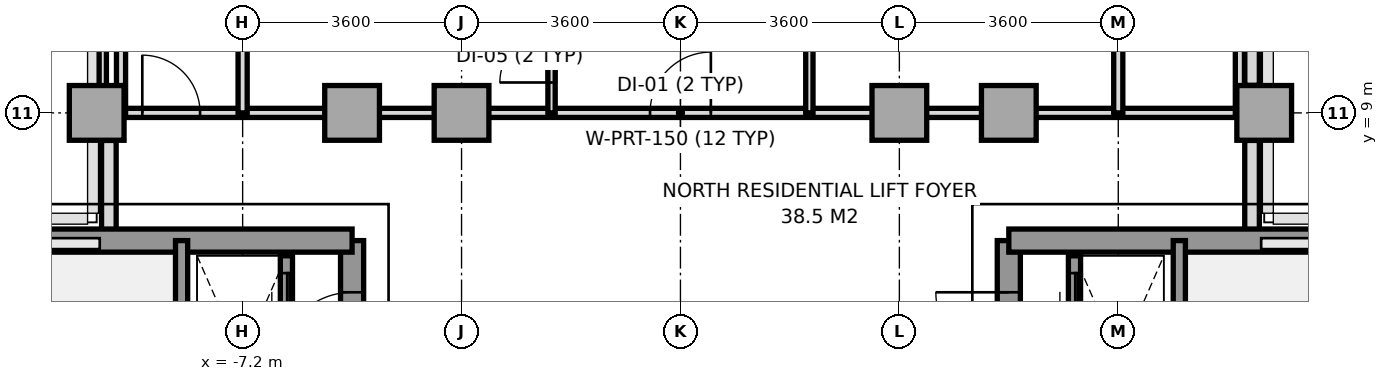
"""IFC4 building model, lengths in metres.
Left out: names, types, materials, properties, quantities, classifications, styles, units other than length and angle.
Written with IfcOpenShell. Run it as: python <this file> out.ifc"""

import sys

from ifc_helpers import new_model, si_unit, direction, frame, frame_2d, origin, origin_2d, place, context, subcontext, project, spatial, rectangle, extrude, source, transform, mapped, element, fill, save


model = new_model("IFC4")
c1 = context("Model", 3, precision=1e-05, world=origin(), true_north=direction((0.0, 1.0)))
c2 = subcontext(c1, "Body", "Model", "MODEL_VIEW")
j1 = project(units=[si_unit("LENGTHUNIT", "METRE"), si_unit("PLANEANGLEUNIT", "RADIAN")], contexts=[c1])
p1 = place(None, origin())
s1 = spatial("IfcSite", under=j1, at=p1, CompositionType="ELEMENT")
p2 = place(p1, origin())
s2 = spatial("IfcBuilding", under=s1, at=p2, CompositionType="ELEMENT")
p3 = place(p2, frame((0.0, 0.0, 204.6)))
s3 = spatial("IfcBuildingStorey", under=s2, at=p3, CompositionType="ELEMENT", Elevation=204.6)
m1 = source(origin(), c2, "Body", "SweptSolid", [
    extrude(rectangle(XDim=0.9, YDim=0.9, at=origin_2d()), origin(), (0.0, 0.0, 1.0), 3.2),
])
for number, where, z_axis, x_axis in (
    (1, (-9.6, 9.0, 0.0), (0.0, 0.0, 1.0), (1.0, 0.0, 0.0)),
    (2, (-5.4, 9.0, 0.0), (0.0, 0.0, 1.0), (1.0, 0.0, 0.0)),
    (3, (-3.6, 9.0, 0.0), (0.0, 0.0, 1.0), (1.0, 0.0, 0.0)),
    (4, (3.6, 9.0, 0.0), (0.0, 0.0, 1.0), (1.0, 0.0, 0.0)),
    (5, (5.4, 9.0, 0.0), (0.0, 0.0, 1.0), (1.0, 0.0, 0.0)),
    (6, (9.6, 9.0, 0.0), (0.0, 0.0, 1.0), (1.0, 0.0, 0.0)),
):
    element("IfcColumn", number, at=place(p3, frame(where, z_axis=z_axis, x_axis=x_axis)), inside=s3, PredefinedType="COLUMN", context=c2, shape_type="MappedRepresentation", body=[
        mapped(m1, transform((0.0, 0.0, 0.0), x_axis=(1.0, 0.0, 0.0), y_axis=(0.0, 1.0, 0.0), z_axis=(0.0, 0.0, 1.0), scale=1.0)),
    ])
p4 = place(p3, frame((-9.4, 6.953, 0.0), z_axis=(0.0, 0.0, 1.0), x_axis=(0.0, 1.0, 0.0)))
e7 = element("IfcWall", 7, at=p4, inside=s3, PredefinedType="PARAPET", context=c2, shape_type="SweptSolid", body=[
    extrude(rectangle(XDim=1.594, YDim=0.24, at=frame_2d((0.797, 0.0))), origin(), (0.0, 0.0, 1.0), 1.15),
])
p5 = place(p3, frame((9.4, 15.358, 0.0), z_axis=(0.0, 0.0, 1.0), x_axis=(0.0, -1.0, 0.0)))
e8 = element("IfcWall", 8, at=p5, inside=s3, PredefinedType="PARAPET", context=c2, shape_type="SweptSolid", body=[
    extrude(rectangle(XDim=5.905, YDim=0.24, at=frame_2d((2.952, 0.0))), origin(), (0.0, 0.0, 1.0), 1.15),
])
p6 = place(p3, frame((9.4, 8.547, 0.0), z_axis=(0.0, 0.0, 1.0), x_axis=(0.0, -1.0, 0.0)))
e9 = element("IfcWall", 9, at=p6, inside=s3, PredefinedType="PARAPET", context=c2, shape_type="SweptSolid", body=[
    extrude(rectangle(XDim=1.594, YDim=0.24, at=frame_2d((0.797, 0.0))), origin(), (0.0, 0.0, 1.0), 1.15),
])
p7 = place(p3, frame((-5.4, -5.6, 0.0), z_axis=(0.0, 0.0, 1.0), x_axis=(0.0, 1.0, 0.0)))
e10 = element("IfcWall", 10, at=p7, inside=s3, PredefinedType="SHEAR", context=c2, shape_type="SweptSolid", body=[
    extrude(rectangle(XDim=12.5, YDim=0.38, at=frame_2d((6.25, 0.0))), origin(), (0.0, 0.0, 1.0), 3.2),
])
p8 = place(p7, frame((4.55, 0.0, 0.0)))
e11 = element("IfcOpeningElement", 11, at=p8, cuts=e10, PredefinedType="OPENING", context=c2, shape_type="SweptSolid", body=[
    extrude(rectangle(XDim=1.2, YDim=2.2, at=frame_2d((0.6, 1.1))), frame((0.0, 0.2, 0.0), z_axis=(0.0, -1.0, 0.0), x_axis=(1.0, 0.0, 0.0)), (0.0, 0.0, 1.0), 0.4),
])
p9 = place(p7, frame((10.45, 0.0, 0.0)))
e12 = element("IfcOpeningElement", 12, at=p9, cuts=e10, PredefinedType="OPENING", context=c2, shape_type="SweptSolid", body=[
    extrude(rectangle(XDim=1.2, YDim=2.2, at=frame_2d((0.6, 1.1))), frame((0.0, 0.2, 0.0), z_axis=(0.0, -1.0, 0.0), x_axis=(1.0, 0.0, 0.0)), (0.0, 0.0, 1.0), 0.4),
])
p10 = place(p7, frame((6.86, 0.0, 0.0)))
e13 = element("IfcOpeningElement", 13, at=p10, cuts=e10, PredefinedType="OPENING", context=c2, shape_type="SweptSolid", body=[
    extrude(rectangle(XDim=0.8, YDim=2.1, at=frame_2d((0.4, 1.05))), frame((0.0, 0.2, 0.0), z_axis=(0.0, -1.0, 0.0), x_axis=(1.0, 0.0, 0.0)), (0.0, 0.0, 1.0), 0.4),
])
p11 = place(p3, frame((-11.356, 6.9, 0.0), z_axis=(0.0, 0.0, 1.0), x_axis=(1.0, 0.0, 0.0)))
e14 = element("IfcWall", 14, at=p11, inside=s3, PredefinedType="SHEAR", context=c2, shape_type="SweptSolid", body=[
    extrude(rectangle(XDim=5.956, YDim=0.38, at=frame_2d((2.978, 0.0))), origin(), (0.0, 0.0, 1.0), 3.2),
])
p12 = place(p3, frame((-8.204, -0.016, 0.0), z_axis=(0.0, 0.0, 1.0), x_axis=(0.0, 1.0, 0.0)))
e15 = element("IfcWall", 15, at=p12, inside=s3, PredefinedType="SOLIDWALL", context=c2, shape_type="SweptSolid", body=[
    extrude(rectangle(XDim=6.916, YDim=0.2, at=frame_2d((3.458, 0.0))), origin(), (0.0, 0.0, 1.0), 3.2),
])
p13 = place(p12, frame((0.2, 0.0, 0.0)))
e16 = element("IfcOpeningElement", 16, at=p13, cuts=e15, PredefinedType="OPENING", context=c2, shape_type="SweptSolid", body=[
    extrude(rectangle(XDim=1.2, YDim=2.2, at=frame_2d((0.6, 1.1))), frame((0.0, 0.11, 0.0), z_axis=(0.0, -1.0, 0.0), x_axis=(1.0, 0.0, 0.0)), (0.0, 0.0, 1.0), 0.22),
])
p14 = place(p3, frame((5.4, -5.6, 0.0), z_axis=(0.0, 0.0, 1.0), x_axis=(0.0, 1.0, 0.0)))
e17 = element("IfcWall", 17, at=p14, inside=s3, PredefinedType="SHEAR", context=c2, shape_type="SweptSolid", body=[
    extrude(rectangle(XDim=12.5, YDim=0.38, at=frame_2d((6.25, 0.0))), origin(), (0.0, 0.0, 1.0), 3.2),
])
p15 = place(p14, frame((4.55, 0.0, 0.0)))
e18 = element("IfcOpeningElement", 18, at=p15, cuts=e17, PredefinedType="OPENING", context=c2, shape_type="SweptSolid", body=[
    extrude(rectangle(XDim=1.2, YDim=2.2, at=frame_2d((0.6, 1.1))), frame((0.0, 0.2, 0.0), z_axis=(0.0, -1.0, 0.0), x_axis=(1.0, 0.0, 0.0)), (0.0, 0.0, 1.0), 0.4),
])
p16 = place(p14, frame((10.45, 0.0, 0.0)))
e19 = element("IfcOpeningElement", 19, at=p16, cuts=e17, PredefinedType="OPENING", context=c2, shape_type="SweptSolid", body=[
    extrude(rectangle(XDim=1.2, YDim=2.2, at=frame_2d((0.6, 1.1))), frame((0.0, 0.2, 0.0), z_axis=(0.0, -1.0, 0.0), x_axis=(1.0, 0.0, 0.0)), (0.0, 0.0, 1.0), 0.4),
])
p17 = place(p14, frame((6.86, 0.0, 0.0)))
e20 = element("IfcOpeningElement", 20, at=p17, cuts=e17, PredefinedType="OPENING", context=c2, shape_type="SweptSolid", body=[
    extrude(rectangle(XDim=0.8, YDim=2.1, at=frame_2d((0.4, 1.05))), frame((0.0, 0.2, 0.0), z_axis=(0.0, -1.0, 0.0), x_axis=(1.0, 0.0, 0.0)), (0.0, 0.0, 1.0), 0.4),
])
p18 = place(p3, frame((5.4, 6.9, 0.0), z_axis=(0.0, 0.0, 1.0), x_axis=(1.0, 0.0, 0.0)))
e21 = element("IfcWall", 21, at=p18, inside=s3, PredefinedType="SHEAR", context=c2, shape_type="SweptSolid", body=[
    extrude(rectangle(XDim=5.956, YDim=0.38, at=frame_2d((2.978, 0.0))), origin(), (0.0, 0.0, 1.0), 3.2),
])
p19 = place(p3, frame((8.204, -0.016, 0.0), z_axis=(0.0, 0.0, 1.0), x_axis=(0.0, 1.0, 0.0)))
e22 = element("IfcWall", 22, at=p19, inside=s3, PredefinedType="SOLIDWALL", context=c2, shape_type="SweptSolid", body=[
    extrude(rectangle(XDim=6.916, YDim=0.2, at=frame_2d((3.458, 0.0))), origin(), (0.0, 0.0, 1.0), 3.2),
])
p20 = place(p19, frame((0.2, 0.0, 0.0)))
e23 = element("IfcOpeningElement", 23, at=p20, cuts=e22, PredefinedType="OPENING", context=c2, shape_type="SweptSolid", body=[
    extrude(rectangle(XDim=1.2, YDim=2.2, at=frame_2d((0.6, 1.1))), frame((0.0, 0.11, 0.0), z_axis=(0.0, -1.0, 0.0), x_axis=(1.0, 0.0, 0.0)), (0.0, 0.0, 1.0), 0.22),
])
p21 = place(p3, frame((-6.48, 4.98, 0.0), z_axis=(0.0, 0.0, 1.0), x_axis=(0.0, 1.0, 0.0)))
e24 = element("IfcWall", 24, at=p21, inside=s3, PredefinedType="SOLIDWALL", context=c2, shape_type="SweptSolid", body=[
    extrude(rectangle(XDim=1.67, YDim=0.2, at=frame_2d((0.835, 0.0))), origin(), (0.0, 0.0, 1.0), 3.2),
])
p22 = place(p21, frame((0.285, 0.0, 0.0)))
e25 = element("IfcOpeningElement", 25, at=p22, cuts=e24, PredefinedType="OPENING", context=c2, shape_type="SweptSolid", body=[
    extrude(rectangle(XDim=1.1, YDim=2.2, at=frame_2d((0.55, 1.1))), frame((0.0, 0.11, 0.0), z_axis=(0.0, -1.0, 0.0), x_axis=(1.0, 0.0, 0.0)), (0.0, 0.0, 1.0), 0.22),
])
p23 = place(p3, frame((6.48, 4.98, 0.0), z_axis=(0.0, 0.0, 1.0), x_axis=(0.0, 1.0, 0.0)))
e26 = element("IfcWall", 26, at=p23, inside=s3, PredefinedType="SOLIDWALL", context=c2, shape_type="SweptSolid", body=[
    extrude(rectangle(XDim=1.67, YDim=0.2, at=frame_2d((0.835, 0.0))), origin(), (0.0, 0.0, 1.0), 3.2),
])
p24 = place(p23, frame((0.285, 0.0, 0.0)))
e27 = element("IfcOpeningElement", 27, at=p24, cuts=e26, PredefinedType="OPENING", context=c2, shape_type="SweptSolid", body=[
    extrude(rectangle(XDim=1.1, YDim=2.2, at=frame_2d((0.55, 1.1))), frame((0.0, 0.11, 0.0), z_axis=(0.0, -1.0, 0.0), x_axis=(1.0, 0.0, 0.0)), (0.0, 0.0, 1.0), 0.22),
])
p25 = place(p3, frame((-9.55, 9.0, 0.0), z_axis=(0.0, 0.0, 1.0), x_axis=(1.0, 0.0, 0.0)))
e28 = element("IfcWall", 28, at=p25, inside=s3, PredefinedType="PARTITIONING", context=c2, shape_type="SweptSolid", body=[
    extrude(rectangle(XDim=19.1, YDim=0.15, at=frame_2d((9.55, 0.0))), origin(), (0.0, 0.0, 1.0), 2.75),
])
p26 = place(p25, frame((0.7, 0.0, 0.0)))
e29 = element("IfcOpeningElement", 29, at=p26, cuts=e28, PredefinedType="OPENING", context=c2, shape_type="SweptSolid", body=[
    extrude(rectangle(XDim=0.95, YDim=2.15, at=frame_2d((0.475, 1.075))), frame((0.0, 0.085, 0.0), z_axis=(0.0, -1.0, 0.0), x_axis=(1.0, 0.0, 0.0)), (0.0, 0.0, 1.0), 0.17),
])
p27 = place(p25, frame((9.05, 0.0, 0.0)))
e30 = element("IfcOpeningElement", 30, at=p27, cuts=e28, PredefinedType="OPENING", context=c2, shape_type="SweptSolid", body=[
    extrude(rectangle(XDim=1.0, YDim=2.2, at=frame_2d((0.5, 1.1))), frame((0.0, 0.085, 0.0), z_axis=(0.0, -1.0, 0.0), x_axis=(1.0, 0.0, 0.0)), (0.0, 0.0, 1.0), 0.17),
])
for number, where, z_axis, x_axis in (
    (31, (-9.2, 9.0, 0.0), (0.0, 0.0, 1.0), (0.0, 1.0, 0.0)),
    (32, (9.2, 9.0, 0.0), (0.0, 0.0, 1.0), (0.0, 1.0, 0.0)),
):
    element("IfcWall", number, at=place(p3, frame(where, z_axis=z_axis, x_axis=x_axis)), inside=s3, PredefinedType="PARTITIONING", context=c2, shape_type="SweptSolid", body=[
        extrude(rectangle(XDim=6.68, YDim=0.15, at=frame_2d((3.34, 0.0))), origin(), (0.0, 0.0, 1.0), 2.75),
    ])
for number, where, z_axis, x_axis in (
    (33, (-7.2, 9.0, 0.0), (0.0, 0.0, 1.0), (0.0, 1.0, 0.0)),
    (34, (7.2, 9.0, 0.0), (0.0, 0.0, 1.0), (0.0, 1.0, 0.0)),
):
    element("IfcWall", number, at=place(p3, frame(where, z_axis=z_axis, x_axis=x_axis)), inside=s3, PredefinedType="PARTITIONING", context=c2, shape_type="SweptSolid", body=[
        extrude(rectangle(XDim=12.02, YDim=0.15, at=frame_2d((6.01, 0.0))), origin(), (0.0, 0.0, 1.0), 2.75),
    ])
p28 = place(p3, frame((-2.12, 9.0, 0.0), z_axis=(0.0, 0.0, 1.0), x_axis=(0.0, 1.0, 0.0)))
e35 = element("IfcWall", 35, at=p28, inside=s3, PredefinedType="PARTITIONING", context=c2, shape_type="SweptSolid", body=[
    extrude(rectangle(XDim=6.6, YDim=0.12, at=frame_2d((3.3, 0.0))), origin(), (0.0, 0.0, 1.0), 2.75),
])
p29 = place(p28, frame((0.5, 0.0, 0.0)))
e36 = element("IfcOpeningElement", 36, at=p29, cuts=e35, PredefinedType="OPENING", context=c2, shape_type="SweptSolid", body=[
    extrude(rectangle(XDim=0.85, YDim=2.1, at=frame_2d((0.425, 1.05))), frame((0.0, 0.07, 0.0), z_axis=(0.0, -1.0, 0.0), x_axis=(1.0, 0.0, 0.0)), (0.0, 0.0, 1.0), 0.14),
])
p30 = place(p28, frame((5.15, 0.0, 0.0)))
e37 = element("IfcOpeningElement", 37, at=p30, cuts=e35, PredefinedType="OPENING", context=c2, shape_type="SweptSolid", body=[
    extrude(rectangle(XDim=0.95, YDim=2.15, at=frame_2d((0.475, 1.075))), frame((0.0, 0.07, 0.0), z_axis=(0.0, -1.0, 0.0), x_axis=(1.0, 0.0, 0.0)), (0.0, 0.0, 1.0), 0.14),
])
p31 = place(p3, frame((2.12, 9.0, 0.0), z_axis=(0.0, 0.0, 1.0), x_axis=(0.0, 1.0, 0.0)))
e38 = element("IfcWall", 38, at=p31, inside=s3, PredefinedType="PARTITIONING", context=c2, shape_type="SweptSolid", body=[
    extrude(rectangle(XDim=6.6, YDim=0.12, at=frame_2d((3.3, 0.0))), origin(), (0.0, 0.0, 1.0), 2.75),
])
p32 = place(p31, frame((1.6, 0.0, 0.0)))
e39 = element("IfcOpeningElement", 39, at=p32, cuts=e38, PredefinedType="OPENING", context=c2, shape_type="SweptSolid", body=[
    extrude(rectangle(XDim=0.95, YDim=2.15, at=frame_2d((0.475, 1.075))), frame((0.0, 0.07, 0.0), z_axis=(0.0, -1.0, 0.0), x_axis=(1.0, 0.0, 0.0)), (0.0, 0.0, 1.0), 0.14),
])
p33 = place(p3, frame((-9.5, 9.0, 0.0), z_axis=(0.0, 0.0, 1.0), x_axis=(0.0, 1.0, 0.0)))
e40 = element("IfcWall", 40, at=p33, inside=s3, PredefinedType="PARTITIONING", context=c2, shape_type="SweptSolid", body=[
    extrude(rectangle(XDim=4.2, YDim=0.12, at=frame_2d((2.1, 0.0))), origin(), (0.0, 0.0, 1.0), 3.2),
])
m2 = source(origin(), c2, "Body", "SweptSolid", [
    extrude(rectangle(XDim=1.2, YDim=2.2, at=frame_2d((0.6, 1.1))), frame((0.0, 0.025, 0.0), z_axis=(0.0, -1.0, 0.0), x_axis=(1.0, 0.0, 0.0)), (0.0, 0.0, 1.0), 0.05),
])
p34 = place(p9, origin())
e41 = element("IfcDoor", 41, at=p34, inside=s3, OperationType="SINGLE_SWING_LEFT", PredefinedType="DOOR", context=c2, shape_type="MappedRepresentation", body=[
    mapped(m2, transform((0.0, 0.0, 0.0), x_axis=(1.0, 0.0, 0.0), y_axis=(0.0, 1.0, 0.0), z_axis=(0.0, 0.0, 1.0), scale=1.0)),
])
fill(e12, e41)
p35 = place(p16, origin())
e42 = element("IfcDoor", 42, at=p35, inside=s3, OperationType="SINGLE_SWING_RIGHT", PredefinedType="DOOR", context=c2, shape_type="MappedRepresentation", body=[
    mapped(m2, transform((0.0, 0.0, 0.0), x_axis=(1.0, 0.0, 0.0), y_axis=(0.0, 1.0, 0.0), z_axis=(0.0, 0.0, 1.0), scale=1.0)),
])
fill(e19, e42)
m3 = source(origin(), c2, "Body", "SweptSolid", [
    extrude(rectangle(XDim=1.1, YDim=2.2, at=frame_2d((0.55, 1.1))), frame((0.0, 0.025, 0.0), z_axis=(0.0, -1.0, 0.0), x_axis=(1.0, 0.0, 0.0)), (0.0, 0.0, 1.0), 0.05),
])
p36 = place(p22, origin())
e43 = element("IfcDoor", 43, at=p36, inside=s3, OperationType="SLIDING_TO_LEFT", PredefinedType="DOOR", context=c2, shape_type="MappedRepresentation", body=[
    mapped(m3, transform((0.0, 0.0, 0.0), x_axis=(1.0, 0.0, 0.0), y_axis=(0.0, 1.0, 0.0), z_axis=(0.0, 0.0, 1.0), scale=1.0)),
])
fill(e25, e43)
p37 = place(p24, origin())
e44 = element("IfcDoor", 44, at=p37, inside=s3, OperationType="SLIDING_TO_LEFT", PredefinedType="DOOR", context=c2, shape_type="MappedRepresentation", body=[
    mapped(m3, transform((0.0, 0.0, 0.0), x_axis=(1.0, 0.0, 0.0), y_axis=(0.0, 1.0, 0.0), z_axis=(0.0, 0.0, 1.0), scale=1.0)),
])
fill(e27, e44)
m4 = source(origin(), c2, "Body", "SweptSolid", [
    extrude(rectangle(XDim=0.95, YDim=2.15, at=frame_2d((0.475, 1.075))), frame((0.0, 0.025, 0.0), z_axis=(0.0, -1.0, 0.0), x_axis=(1.0, 0.0, 0.0)), (0.0, 0.0, 1.0), 0.05),
])
p38 = place(p26, origin())
e45 = element("IfcDoor", 45, at=p38, inside=s3, OperationType="SINGLE_SWING_LEFT", PredefinedType="DOOR", context=c2, shape_type="MappedRepresentation", body=[
    mapped(m4, transform((0.0, 0.0, 0.0), x_axis=(1.0, 0.0, 0.0), y_axis=(0.0, 1.0, 0.0), z_axis=(0.0, 0.0, 1.0), scale=1.0)),
])
fill(e29, e45)
m5 = source(origin(), c2, "Body", "SweptSolid", [
    extrude(rectangle(XDim=1.0, YDim=2.2, at=frame_2d((0.5, 1.1))), frame((0.0, 0.025, 0.0), z_axis=(0.0, -1.0, 0.0), x_axis=(1.0, 0.0, 0.0)), (0.0, 0.0, 1.0), 0.05),
])
p39 = place(p27, origin())
e46 = element("IfcDoor", 46, at=p39, inside=s3, OperationType="SINGLE_SWING_RIGHT", PredefinedType="DOOR", context=c2, shape_type="MappedRepresentation", body=[
    mapped(m5, transform((0.0, 0.0, 0.0), x_axis=(1.0, 0.0, 0.0), y_axis=(0.0, 1.0, 0.0), z_axis=(0.0, 0.0, 1.0), scale=1.0)),
])
fill(e30, e46)
m6 = source(origin(), c2, "Body", "SweptSolid", [
    extrude(rectangle(XDim=0.85, YDim=2.1, at=frame_2d((0.425, 1.05))), frame((0.0, 0.025, 0.0), z_axis=(0.0, -1.0, 0.0), x_axis=(1.0, 0.0, 0.0)), (0.0, 0.0, 1.0), 0.05),
])
p40 = place(p29, origin())
e47 = element("IfcDoor", 47, at=p40, inside=s3, OperationType="SINGLE_SWING_LEFT", PredefinedType="DOOR", context=c2, shape_type="MappedRepresentation", body=[
    mapped(m6, transform((0.0, 0.0, 0.0), x_axis=(1.0, 0.0, 0.0), y_axis=(0.0, 1.0, 0.0), z_axis=(0.0, 0.0, 1.0), scale=1.0)),
])
fill(e36, e47)
save(model, sys.argv[1])
